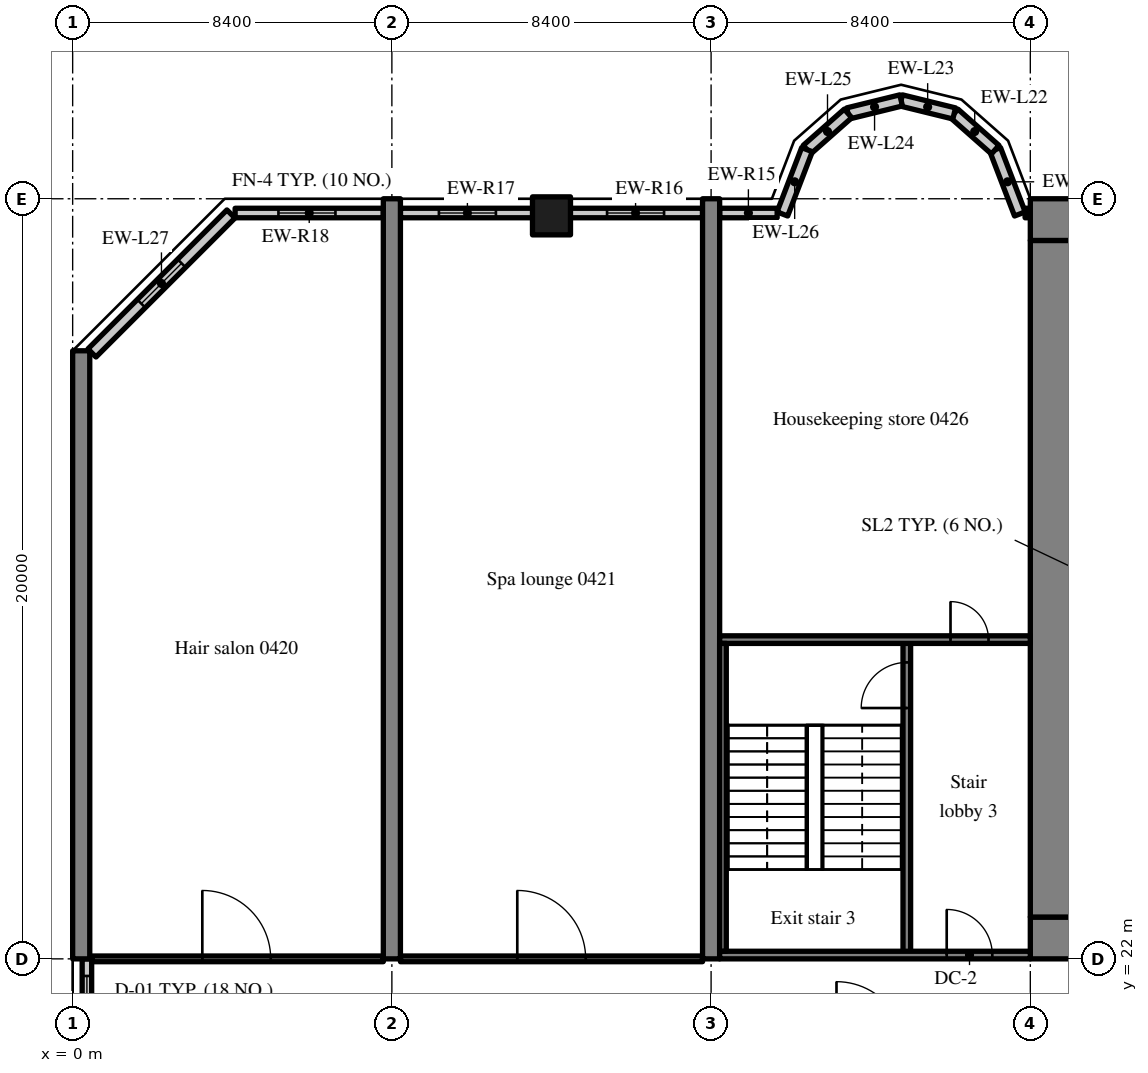
"""IFC4 building model, lengths in metres.
Left out: names, types, materials, properties, quantities, classifications, styles, units other than length and angle.
Written with IfcOpenShell. Run it as: python <this file> out.ifc"""

import sys

from ifc_helpers import new_model, si_unit, direction, frame, frame_2d, origin, origin_2d, place, context, subcontext, project, spatial, rectangle, extrude, source, transform, mapped, element, fill, save


model = new_model("IFC4")
c1 = context("Model", 3, precision=1e-05, world=origin(), true_north=direction((0.0, 1.0)))
c2 = subcontext(c1, "Body", "Model", "MODEL_VIEW")
j1 = project(units=[si_unit("LENGTHUNIT", "METRE"), si_unit("PLANEANGLEUNIT", "RADIAN")], contexts=[c1])
p1 = place(None, origin())
s1 = spatial("IfcSite", under=j1, at=p1, CompositionType="ELEMENT")
p2 = place(p1, origin())
s2 = spatial("IfcBuilding", under=s1, at=p2, CompositionType="ELEMENT")
p3 = place(p2, frame((0.0, 0.0, 23.0)))
s3 = spatial("IfcBuildingStorey", under=s2, at=p3, CompositionType="ELEMENT", Elevation=23.0)
m1 = source(origin(), c2, "Body", "SweptSolid", [
    extrude(rectangle(XDim=50.4, YDim=1.1, at=frame_2d((25.2, 0.0))), origin(), (0.0, 0.0, 1.0), 4.52),
])
p4 = place(p3, frame((25.2, 22.55, 0.0), z_axis=(0.0, 0.0, 1.0), x_axis=(1.0, 0.0, 0.0)))
e1 = element("IfcWall", 1, at=p4, inside=s3, PredefinedType="SHEAR", context=c2, shape_type="MappedRepresentation", body=[
    mapped(m1, transform((0.0, 0.0, 0.0), scale=1.0)),
])
m2 = source(origin(), c2, "Body", "SweptSolid", [
    extrude(rectangle(XDim=1.8, YDim=2.1, at=frame_2d((0.9, 1.05))), frame((0.0, 0.56, 0.0), z_axis=(0.0, -1.0, 0.0), x_axis=(1.0, 0.0, 0.0)), (0.0, 0.0, 1.0), 1.12),
])
p5 = place(p4, frame((15.9, 0.0, 0.0)))
e2 = element("IfcOpeningElement", 2, at=p5, cuts=e1, PredefinedType="OPENING", context=c2, shape_type="MappedRepresentation", body=[
    mapped(m2, transform((0.0, 0.0, 0.0), scale=1.0)),
])
m3 = source(origin(), c2, "Body", "SweptSolid", [
    extrude(rectangle(XDim=1.2, YDim=2.1, at=frame_2d((0.6, 1.05))), frame((0.0, 0.56, 0.0), z_axis=(0.0, -1.0, 0.0), x_axis=(1.0, 0.0, 0.0)), (0.0, 0.0, 1.0), 1.12),
])
p6 = place(p4, frame((27.0, 0.0, 0.0)))
e3 = element("IfcOpeningElement", 3, at=p6, cuts=e1, PredefinedType="OPENING", context=c2, shape_type="MappedRepresentation", body=[
    mapped(m3, transform((0.0, 0.0, 0.0), scale=1.0)),
])
m4 = source(origin(), c2, "Body", "SweptSolid", [
    extrude(rectangle(XDim=0.9, YDim=2.1, at=frame_2d((0.45, 1.05))), frame((0.0, 0.56, 0.0), z_axis=(0.0, -1.0, 0.0), x_axis=(1.0, 0.0, 0.0)), (0.0, 0.0, 1.0), 1.12),
])
p7 = place(p4, frame((32.25, 0.0, 0.0)))
e4 = element("IfcOpeningElement", 4, at=p7, cuts=e1, PredefinedType="OPENING", context=c2, shape_type="MappedRepresentation", body=[
    mapped(m4, transform((0.0, 0.0, 0.0), scale=1.0)),
])
p8 = place(p4, frame((38.25, 0.0, 0.0)))
e5 = element("IfcOpeningElement", 5, at=p8, cuts=e1, PredefinedType="OPENING", context=c2, shape_type="MappedRepresentation", body=[
    mapped(m4, transform((0.0, 0.0, 0.0), scale=1.0)),
])
p9 = place(p4, frame((6.425, 0.0, 0.0)))
e6 = element("IfcOpeningElement", 6, at=p9, cuts=e1, PredefinedType="OPENING", context=c2, shape_type="MappedRepresentation", body=[
    mapped(m3, transform((0.0, 0.0, 0.0), scale=1.0)),
])
p10 = place(p4, frame((47.675, 0.0, 0.0)))
e7 = element("IfcOpeningElement", 7, at=p10, cuts=e1, PredefinedType="OPENING", context=c2, shape_type="MappedRepresentation", body=[
    mapped(m3, transform((0.0, 0.0, 0.0), scale=1.0)),
])
p11 = place(p3, frame((25.2, 41.45, 0.0), z_axis=(0.0, 0.0, 1.0), x_axis=(1.0, 0.0, 0.0)))
e8 = element("IfcWall", 8, at=p11, inside=s3, PredefinedType="SHEAR", context=c2, shape_type="MappedRepresentation", body=[
    mapped(m1, transform((0.0, 0.0, 0.0), scale=1.0)),
])
m5 = source(origin(), c2, "Body", "SweptSolid", [
    extrude(rectangle(XDim=17.8, YDim=1.1, at=frame_2d((8.9, 0.0))), origin(), (0.0, 0.0, 1.0), 4.52),
])
p12 = place(p3, frame((25.75, 23.1, 0.0), z_axis=(0.0, 0.0, 1.0), x_axis=(0.0, 1.0, 0.0)))
e9 = element("IfcWall", 9, at=p12, inside=s3, PredefinedType="SHEAR", context=c2, shape_type="MappedRepresentation", body=[
    mapped(m5, transform((0.0, 0.0, 0.0), scale=1.0)),
])
m6 = source(origin(), c2, "Body", "SweptSolid", [
    extrude(rectangle(XDim=16.0, YDim=0.45, at=frame_2d((8.0, 0.0))), origin(), (0.0, 0.0, 1.0), 4.52),
])
p13 = place(p3, frame((0.225, 22.0, 0.0), z_axis=(0.0, 0.0, 1.0), x_axis=(0.0, 1.0, 0.0)))
e10 = element("IfcWall", 10, at=p13, inside=s3, PredefinedType="SHEAR", context=c2, shape_type="MappedRepresentation", body=[
    mapped(m6, transform((0.0, 0.0, 0.0), scale=1.0)),
])
m7 = source(origin(), c2, "Body", "SweptSolid", [
    extrude(rectangle(XDim=20.0, YDim=0.45, at=frame_2d((10.0, 0.0))), origin(), (0.0, 0.0, 1.0), 4.52),
])
for number, where, z_axis, x_axis in (
    (11, (8.4, 22.0, 0.0), (0.0, 0.0, 1.0), (0.0, 1.0, 0.0)),
    (12, (16.8, 22.0, 0.0), (0.0, 0.0, 1.0), (0.0, 1.0, 0.0)),
):
    element("IfcWall", number, at=place(p3, frame(where, z_axis=z_axis, x_axis=x_axis)), inside=s3, PredefinedType="SHEAR", context=c2, shape_type="MappedRepresentation", body=[
        mapped(m7, transform((0.0, 0.0, 0.0), scale=1.0)),
    ])
m8 = source(origin(), c2, "Body", "SweptSolid", [
    extrude(rectangle(XDim=1.0, YDim=1.0, at=origin_2d()), origin(), (0.0, 0.0, 1.0), 4.52),
])
p14 = place(p3, frame((12.6, 41.55, 0.0), z_axis=(0.0, 0.0, 1.0), x_axis=(1.0, 0.0, 0.0)))
e13 = element("IfcColumn", 13, at=p14, inside=s3, PredefinedType="COLUMN", context=c2, shape_type="MappedRepresentation", body=[
    mapped(m8, transform((0.0, 0.0, 0.0), scale=1.0)),
])
m9 = source(origin(), c2, "Body", "SweptSolid", [
    extrude(rectangle(XDim=0.138, YDim=0.25, at=frame_2d((0.069, 0.0))), origin(), (0.0, 0.0, 1.0), 3.77),
])
p15 = place(p3, frame((25.2, 41.625, 0.0), z_axis=(0.0, 0.0, 1.0), x_axis=(-1.0, 0.0, 0.0)))
e14 = element("IfcWall", 14, at=p15, inside=s3, PredefinedType="SOLIDWALL", context=c2, shape_type="MappedRepresentation", body=[
    mapped(m9, transform((0.0, 0.0, 0.0), scale=1.0)),
])
m10 = source(origin(), c2, "Body", "SweptSolid", [
    extrude(rectangle(XDim=1.812, YDim=0.3, at=frame_2d((0.906, 0.0))), origin(), (0.0, 0.0, 1.0), 4.52),
])
p16 = place(p3, frame((24.925, 41.6, 0.0), z_axis=(0.0, 0.0, 1.0), x_axis=(-0.357759776872, 0.933813654886, 0.0)))
e15 = element("IfcWall", 15, at=p16, inside=s3, PredefinedType="SOLIDWALL", context=c2, shape_type="MappedRepresentation", body=[
    mapped(m10, transform((0.0, 0.0, 0.0), scale=1.0)),
])
m11 = source(origin(), c2, "Body", "SweptSolid", [
    extrude(rectangle(XDim=1.44, YDim=0.3, at=frame_2d((0.72, 0.0))), origin(), (0.0, 0.0, 1.0), 4.52),
])
p17 = place(p3, frame((24.277, 43.292, 0.0), z_axis=(0.0, 0.0, 1.0), x_axis=(-0.749649827867, 0.661834673902, 0.0)))
e16 = element("IfcWall", 16, at=p17, inside=s3, PredefinedType="SOLIDWALL", context=c2, shape_type="MappedRepresentation", body=[
    mapped(m11, transform((0.0, 0.0, 0.0), scale=1.0)),
])
m12 = source(origin(), c2, "Body", "SweptSolid", [
    extrude(rectangle(XDim=1.438, YDim=0.3, at=frame_2d((0.719, 0.0))), origin(), (0.0, 0.0, 1.0), 4.52),
])
p18 = place(p3, frame((23.197, 44.245, 0.0), z_axis=(0.0, 0.0, 1.0), x_axis=(-0.971152283879, 0.238460146601, 0.0)))
e17 = element("IfcWall", 17, at=p18, inside=s3, PredefinedType="SOLIDWALL", context=c2, shape_type="MappedRepresentation", body=[
    mapped(m12, transform((0.0, 0.0, 0.0), scale=1.0)),
])
m13 = source(origin(), c2, "Body", "SweptSolid", [
    extrude(rectangle(XDim=1.439, YDim=0.3, at=frame_2d((0.719, 0.0))), origin(), (0.0, 0.0, 1.0), 4.52),
])
p19 = place(p3, frame((21.8, 44.588, 0.0), z_axis=(0.0, 0.0, 1.0), x_axis=(-0.971161932466, -0.238420848351, 0.0)))
e18 = element("IfcWall", 18, at=p19, inside=s3, PredefinedType="SOLIDWALL", context=c2, shape_type="MappedRepresentation", body=[
    mapped(m13, transform((0.0, 0.0, 0.0), scale=1.0)),
])
m14 = source(origin(), c2, "Body", "SweptSolid", [
    extrude(rectangle(XDim=1.44, YDim=0.3, at=frame_2d((0.72, 0.0))), origin(), (0.0, 0.0, 1.0), 4.52),
])
p20 = place(p3, frame((20.403, 44.245, 0.0), z_axis=(0.0, 0.0, 1.0), x_axis=(-0.74957555648, -0.661918790432, 0.0)))
e19 = element("IfcWall", 19, at=p20, inside=s3, PredefinedType="SOLIDWALL", context=c2, shape_type="MappedRepresentation", body=[
    mapped(m14, transform((0.0, 0.0, 0.0), scale=1.0)),
])
m15 = source(origin(), c2, "Body", "SweptSolid", [
    extrude(rectangle(XDim=1.812, YDim=0.3, at=frame_2d((0.906, 0.0))), origin(), (0.0, 0.0, 1.0), 4.52),
])
p21 = place(p3, frame((19.323, 43.292, 0.0), z_axis=(0.0, 0.0, 1.0), x_axis=(-0.357877270961, -0.93376863244, 0.0)))
e20 = element("IfcWall", 20, at=p21, inside=s3, PredefinedType="SOLIDWALL", context=c2, shape_type="MappedRepresentation", body=[
    mapped(m15, transform((0.0, 0.0, 0.0), scale=1.0)),
])
m16 = source(origin(), c2, "Body", "SweptSolid", [
    extrude(rectangle(XDim=1.513, YDim=0.25, at=frame_2d((0.756, 0.0))), origin(), (0.0, 0.0, 1.0), 3.77),
])
p22 = place(p3, frame((18.538, 41.625, 0.0), z_axis=(0.0, 0.0, 1.0), x_axis=(-1.0, 0.0, 0.0)))
e21 = element("IfcWall", 21, at=p22, inside=s3, PredefinedType="SOLIDWALL", context=c2, shape_type="MappedRepresentation", body=[
    mapped(m16, transform((0.0, 0.0, 0.0), scale=1.0)),
])
m17 = source(origin(), c2, "Body", "SweptSolid", [
    extrude(rectangle(XDim=3.525, YDim=0.25, at=frame_2d((1.762, 0.0))), origin(), (0.0, 0.0, 1.0), 3.77),
])
p23 = place(p3, frame((16.575, 41.625, 0.0), z_axis=(0.0, 0.0, 1.0), x_axis=(-1.0, 0.0, 0.0)))
e22 = element("IfcWall", 22, at=p23, inside=s3, PredefinedType="SOLIDWALL", context=c2, shape_type="MappedRepresentation", body=[
    mapped(m17, transform((0.0, 0.0, 0.0), scale=1.0)),
])
m18 = source(origin(), c2, "Body", "SweptSolid", [
    extrude(rectangle(XDim=1.5, YDim=1.5, at=frame_2d((0.75, 0.75))), frame((0.0, 0.135, 0.0), z_axis=(0.0, -1.0, 0.0), x_axis=(1.0, 0.0, 0.0)), (0.0, 0.0, 1.0), 0.27),
])
p24 = place(p23, frame((1.012, 0.0, 0.9)))
e23 = element("IfcOpeningElement", 23, at=p24, cuts=e22, PredefinedType="OPENING", context=c2, shape_type="MappedRepresentation", body=[
    mapped(m18, transform((0.0, 0.0, 0.0), scale=1.0)),
])
p25 = place(p3, frame((12.15, 41.625, 0.0), z_axis=(0.0, 0.0, 1.0), x_axis=(-1.0, 0.0, 0.0)))
e24 = element("IfcWall", 24, at=p25, inside=s3, PredefinedType="SOLIDWALL", context=c2, shape_type="MappedRepresentation", body=[
    mapped(m17, transform((0.0, 0.0, 0.0), scale=1.0)),
])
p26 = place(p25, frame((1.012, 0.0, 0.9)))
e25 = element("IfcOpeningElement", 25, at=p26, cuts=e24, PredefinedType="OPENING", context=c2, shape_type="MappedRepresentation", body=[
    mapped(m18, transform((0.0, 0.0, 0.0), scale=1.0)),
])
m19 = source(origin(), c2, "Body", "SweptSolid", [
    extrude(rectangle(XDim=3.9, YDim=0.25, at=frame_2d((1.95, 0.0))), origin(), (0.0, 0.0, 1.0), 3.77),
])
p27 = place(p3, frame((8.175, 41.625, 0.0), z_axis=(0.0, 0.0, 1.0), x_axis=(-1.0, 0.0, 0.0)))
e26 = element("IfcWall", 26, at=p27, inside=s3, PredefinedType="SOLIDWALL", context=c2, shape_type="MappedRepresentation", body=[
    mapped(m19, transform((0.0, 0.0, 0.0), scale=1.0)),
])
p28 = place(p27, frame((1.26, 0.0, 0.9)))
e27 = element("IfcOpeningElement", 27, at=p28, cuts=e26, PredefinedType="OPENING", context=c2, shape_type="MappedRepresentation", body=[
    mapped(m18, transform((0.0, 0.0, 0.0), scale=1.0)),
])
m20 = source(origin(), c2, "Body", "SweptSolid", [
    extrude(rectangle(XDim=5.173, YDim=0.3, at=frame_2d((2.586, 0.0))), origin(), (0.0, 0.0, 1.0), 3.77),
])
p29 = place(p3, frame((4.166, 41.6, 0.0), z_axis=(0.0, 0.0, 1.0), x_axis=(-0.707106781187, -0.707106781187, 0.0)))
e28 = element("IfcWall", 28, at=p29, inside=s3, PredefinedType="SOLIDWALL", context=c2, shape_type="MappedRepresentation", body=[
    mapped(m20, transform((0.0, 0.0, 0.0), scale=1.0)),
])
m21 = source(origin(), c2, "Body", "SweptSolid", [
    extrude(rectangle(XDim=1.5, YDim=1.5, at=frame_2d((0.75, 0.75))), frame((0.0, 0.16, 0.0), z_axis=(0.0, -1.0, 0.0), x_axis=(1.0, 0.0, 0.0)), (0.0, 0.0, 1.0), 0.32),
])
p30 = place(p29, frame((1.836, 0.0, 0.9)))
e29 = element("IfcOpeningElement", 29, at=p30, cuts=e28, PredefinedType="OPENING", context=c2, shape_type="MappedRepresentation", body=[
    mapped(m21, transform((0.0, 0.0, 0.0), scale=1.0)),
])
m22 = source(origin(), c2, "Body", "SweptSolid", [
    extrude(rectangle(XDim=2.4, YDim=0.25, at=frame_2d((1.2, 0.0))), origin(), (0.0, 0.0, 1.0), 3.62),
])
p31 = place(p3, frame((0.375, 22.0, 0.0), z_axis=(0.0, 0.0, 1.0), x_axis=(0.0, -1.0, 0.0)))
e30 = element("IfcWall", 30, at=p31, inside=s3, PredefinedType="SOLIDWALL", context=c2, shape_type="MappedRepresentation", body=[
    mapped(m22, transform((0.0, 0.0, 0.0), scale=1.0)),
])
p32 = place(p31, frame((0.45, 0.0, 0.9)))
e31 = element("IfcOpeningElement", 31, at=p32, cuts=e30, PredefinedType="OPENING", context=c2, shape_type="MappedRepresentation", body=[
    mapped(m18, transform((0.0, 0.0, 0.0), scale=1.0)),
])
m23 = source(origin(), c2, "Body", "SweptSolid", [
    extrude(rectangle(XDim=8.3, YDim=0.2, at=frame_2d((4.15, 0.0))), origin(), (0.0, 0.0, 1.0), 4.52),
])
p33 = place(p3, frame((21.95, 22.1, 0.0), z_axis=(0.0, 0.0, 1.0), x_axis=(0.0, 1.0, 0.0)))
e32 = element("IfcWall", 32, at=p33, inside=s3, PredefinedType="SOLIDWALL", context=c2, shape_type="MappedRepresentation", body=[
    mapped(m23, transform((0.0, 0.0, 0.0), scale=1.0)),
])
m24 = source(origin(), c2, "Body", "SweptSolid", [
    extrude(rectangle(XDim=1.2, YDim=2.1, at=frame_2d((0.6, 1.05))), frame((0.0, 0.11, 0.0), z_axis=(0.0, -1.0, 0.0), x_axis=(1.0, 0.0, 0.0)), (0.0, 0.0, 1.0), 0.22),
])
p34 = place(p33, frame((6.5, 0.0, 0.0)))
e33 = element("IfcOpeningElement", 33, at=p34, cuts=e32, PredefinedType="OPENING", context=c2, shape_type="MappedRepresentation", body=[
    mapped(m24, transform((0.0, 0.0, 0.0), scale=1.0)),
])
m25 = source(origin(), c2, "Body", "SweptSolid", [
    extrude(rectangle(XDim=8.175, YDim=0.2, at=frame_2d((4.087, 0.0))), origin(), (0.0, 0.0, 1.0), 4.52),
])
p35 = place(p3, frame((17.025, 22.1, 0.0), z_axis=(0.0, 0.0, 1.0), x_axis=(1.0, 0.0, 0.0)))
e34 = element("IfcWall", 34, at=p35, inside=s3, PredefinedType="SOLIDWALL", context=c2, shape_type="MappedRepresentation", body=[
    mapped(m25, transform((0.0, 0.0, 0.0), scale=1.0)),
])
p36 = place(p35, frame((5.975, 0.0, 0.0)))
e35 = element("IfcOpeningElement", 35, at=p36, cuts=e34, PredefinedType="OPENING", context=c2, shape_type="MappedRepresentation", body=[
    mapped(m24, transform((0.0, 0.0, 0.0), scale=1.0)),
])
p37 = place(p3, frame((17.025, 30.4, 0.0), z_axis=(0.0, 0.0, 1.0), x_axis=(1.0, 0.0, 0.0)))
e36 = element("IfcWall", 36, at=p37, inside=s3, PredefinedType="SOLIDWALL", context=c2, shape_type="MappedRepresentation", body=[
    mapped(m25, transform((0.0, 0.0, 0.0), scale=1.0)),
])
m26 = source(origin(), c2, "Body", "SweptSolid", [
    extrude(rectangle(XDim=1.0, YDim=2.1, at=frame_2d((0.5, 1.05))), frame((0.0, 0.11, 0.0), z_axis=(0.0, -1.0, 0.0), x_axis=(1.0, 0.0, 0.0)), (0.0, 0.0, 1.0), 0.22),
])
p38 = place(p37, frame((6.075, 0.0, 0.0)))
e37 = element("IfcOpeningElement", 37, at=p38, cuts=e36, PredefinedType="OPENING", context=c2, shape_type="MappedRepresentation", body=[
    mapped(m26, transform((0.0, 0.0, 0.0), scale=1.0)),
])
m27 = source(origin(), c2, "Body", "SweptSolid", [
    extrude(rectangle(XDim=8.1, YDim=0.175, at=frame_2d((4.05, 0.0))), origin(), (0.0, 0.0, 1.0), 4.52),
])
p39 = place(p3, frame((17.112, 22.2, 0.0), z_axis=(0.0, 0.0, 1.0), x_axis=(0.0, 1.0, 0.0)))
e38 = element("IfcWall", 38, at=p39, inside=s3, PredefinedType="SOLIDWALL", context=c2, shape_type="MappedRepresentation", body=[
    mapped(m27, transform((0.0, 0.0, 0.0), scale=1.0)),
])
m28 = source(origin(), c2, "Body", "SweptSolid", [
    extrude(rectangle(XDim=7.675, YDim=0.15, at=frame_2d((3.837, 0.0))), origin(), (0.0, 0.0, 1.0), 3.82),
])
p40 = place(p3, frame((0.5, 22.0, 0.0), z_axis=(0.0, 0.0, 1.0), x_axis=(1.0, 0.0, 0.0)))
e39 = element("IfcWall", 39, at=p40, inside=s3, PredefinedType="PARTITIONING", context=c2, shape_type="MappedRepresentation", body=[
    mapped(m28, transform((0.0, 0.0, 0.0), scale=1.0)),
])
m29 = source(origin(), c2, "Body", "SweptSolid", [
    extrude(rectangle(XDim=1.8, YDim=2.1, at=frame_2d((0.9, 1.05))), frame((0.0, 0.085, 0.0), z_axis=(0.0, -1.0, 0.0), x_axis=(1.0, 0.0, 0.0)), (0.0, 0.0, 1.0), 0.17),
])
p41 = place(p40, frame((2.912, 0.0, 0.0)))
e40 = element("IfcOpeningElement", 40, at=p41, cuts=e39, PredefinedType="OPENING", context=c2, shape_type="MappedRepresentation", body=[
    mapped(m29, transform((0.0, 0.0, 0.0), scale=1.0)),
])
m30 = source(origin(), c2, "Body", "SweptSolid", [
    extrude(rectangle(XDim=7.95, YDim=0.15, at=frame_2d((3.975, 0.0))), origin(), (0.0, 0.0, 1.0), 3.82),
])
p42 = place(p3, frame((8.625, 22.0, 0.0), z_axis=(0.0, 0.0, 1.0), x_axis=(1.0, 0.0, 0.0)))
e41 = element("IfcWall", 41, at=p42, inside=s3, PredefinedType="PARTITIONING", context=c2, shape_type="MappedRepresentation", body=[
    mapped(m30, transform((0.0, 0.0, 0.0), scale=1.0)),
])
p43 = place(p42, frame((3.075, 0.0, 0.0)))
e42 = element("IfcOpeningElement", 42, at=p43, cuts=e41, PredefinedType="OPENING", context=c2, shape_type="MappedRepresentation", body=[
    mapped(m29, transform((0.0, 0.0, 0.0), scale=1.0)),
])
m31 = source(origin(), c2, "Body", "SweptSolid", [
    extrude(rectangle(XDim=1.5, YDim=1.5, at=frame_2d((0.75, 0.75))), frame((0.0, 0.03, 0.0), z_axis=(0.0, -1.0, 0.0), x_axis=(1.0, 0.0, 0.0)), (0.0, 0.0, 1.0), 0.06),
])
p44 = place(p24, origin())
e43 = element("IfcWindow", 43, at=p44, inside=s3, PartitioningType="SINGLE_PANEL", PredefinedType="WINDOW", context=c2, shape_type="MappedRepresentation", body=[
    mapped(m31, transform((0.0, 0.0, 0.0), scale=1.0)),
])
fill(e23, e43)
p45 = place(p26, origin())
e44 = element("IfcWindow", 44, at=p45, inside=s3, PartitioningType="SINGLE_PANEL", PredefinedType="WINDOW", context=c2, shape_type="MappedRepresentation", body=[
    mapped(m31, transform((0.0, 0.0, 0.0), scale=1.0)),
])
fill(e25, e44)
p46 = place(p28, origin())
e45 = element("IfcWindow", 45, at=p46, inside=s3, PartitioningType="SINGLE_PANEL", PredefinedType="WINDOW", context=c2, shape_type="MappedRepresentation", body=[
    mapped(m31, transform((0.0, 0.0, 0.0), scale=1.0)),
])
fill(e27, e45)
p47 = place(p30, origin())
e46 = element("IfcWindow", 46, at=p47, inside=s3, PartitioningType="SINGLE_PANEL", PredefinedType="WINDOW", context=c2, shape_type="MappedRepresentation", body=[
    mapped(m31, transform((0.0, 0.0, 0.0), scale=1.0)),
])
fill(e29, e46)
p48 = place(p32, origin())
e47 = element("IfcWindow", 47, at=p48, inside=s3, PartitioningType="SINGLE_PANEL", PredefinedType="WINDOW", context=c2, shape_type="MappedRepresentation", body=[
    mapped(m31, transform((0.0, 0.0, 0.0), scale=1.0)),
])
fill(e31, e47)
m32 = source(origin(), c2, "Body", "SweptSolid", [
    extrude(rectangle(XDim=1.2, YDim=2.1, at=frame_2d((0.6, 1.05))), frame((0.0, 0.025, 0.0), z_axis=(0.0, -1.0, 0.0), x_axis=(1.0, 0.0, 0.0)), (0.0, 0.0, 1.0), 0.05),
])
p49 = place(p34, origin())
e48 = element("IfcDoor", 48, at=p49, inside=s3, OperationType="SINGLE_SWING_LEFT", PredefinedType="DOOR", context=c2, shape_type="MappedRepresentation", body=[
    mapped(m32, transform((0.0, 0.0, 0.0), scale=1.0)),
])
fill(e33, e48)
p50 = place(p36, origin())
e49 = element("IfcDoor", 49, at=p50, inside=s3, OperationType="SINGLE_SWING_LEFT", PredefinedType="DOOR", context=c2, shape_type="MappedRepresentation", body=[
    mapped(m32, transform((0.0, 0.0, 0.0), scale=1.0)),
])
fill(e35, e49)
m33 = source(origin(), c2, "Body", "SweptSolid", [
    extrude(rectangle(XDim=1.0, YDim=2.1, at=frame_2d((0.5, 1.05))), frame((0.0, 0.025, 0.0), z_axis=(0.0, -1.0, 0.0), x_axis=(1.0, 0.0, 0.0)), (0.0, 0.0, 1.0), 0.05),
])
p51 = place(p38, origin())
e50 = element("IfcDoor", 50, at=p51, inside=s3, OperationType="SINGLE_SWING_LEFT", PredefinedType="DOOR", context=c2, shape_type="MappedRepresentation", body=[
    mapped(m33, transform((0.0, 0.0, 0.0), scale=1.0)),
])
fill(e37, e50)
m34 = source(origin(), c2, "Body", "SweptSolid", [
    extrude(rectangle(XDim=1.8, YDim=2.1, at=frame_2d((0.9, 1.05))), frame((0.0, 0.025, 0.0), z_axis=(0.0, -1.0, 0.0), x_axis=(1.0, 0.0, 0.0)), (0.0, 0.0, 1.0), 0.05),
])
p52 = place(p41, origin())
e51 = element("IfcDoor", 51, at=p52, inside=s3, OperationType="DOUBLE_DOOR_SINGLE_SWING", PredefinedType="DOOR", context=c2, shape_type="MappedRepresentation", body=[
    mapped(m34, transform((0.0, 0.0, 0.0), scale=1.0)),
])
fill(e40, e51)
p53 = place(p43, origin())
e52 = element("IfcDoor", 52, at=p53, inside=s3, OperationType="DOUBLE_DOOR_SINGLE_SWING", PredefinedType="DOOR", context=c2, shape_type="MappedRepresentation", body=[
    mapped(m34, transform((0.0, 0.0, 0.0), scale=1.0)),
])
fill(e42, e52)
save(model, sys.argv[1])
